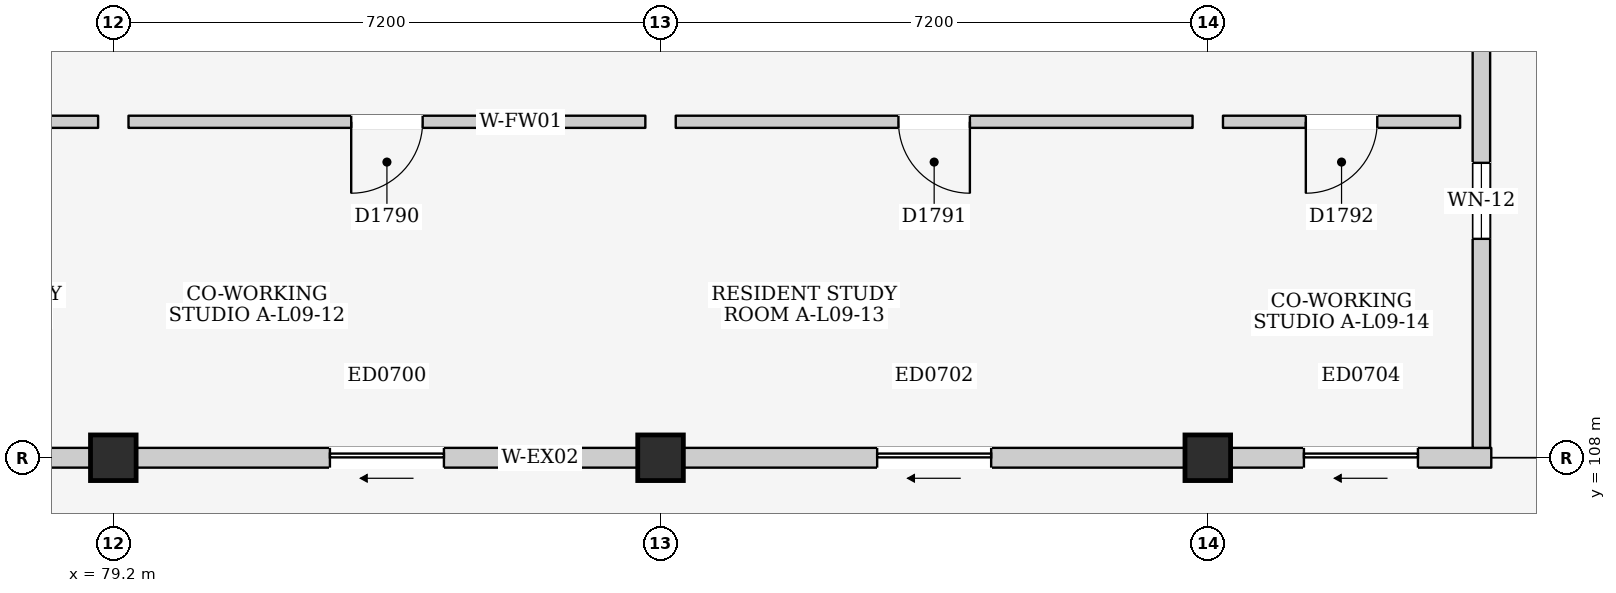
"""IFC4 building model, lengths in metres.
Left out: names, types, materials, properties, quantities, classifications, styles, units other than length and angle.
Written with IfcOpenShell. Run it as: python <this file> out.ifc"""

import sys

from ifc_helpers import new_model, si_unit, direction, frame, frame_2d, origin, origin_2d, place, context, subcontext, project, spatial, rectangle, extrude, element, fill, save


model = new_model("IFC4")
c1 = context("Model", 3, precision=1e-05, world=origin(), true_north=direction((0.0, 1.0)))
c2 = subcontext(c1, "Body", "Model", "MODEL_VIEW")
j1 = project(units=[si_unit("LENGTHUNIT", "METRE"), si_unit("PLANEANGLEUNIT", "RADIAN")], contexts=[c1])
p1 = place(None, origin())
s1 = spatial("IfcSite", under=j1, at=p1, CompositionType="ELEMENT")
p2 = place(p1, origin())
s2 = spatial("IfcBuilding", under=s1, at=p2, CompositionType="ELEMENT")
p3 = place(p2, frame((0.0, 0.0, 31.5)))
s3 = spatial("IfcBuildingStorey", under=s2, at=p3, CompositionType="ELEMENT", Elevation=31.5)
for number, where, z_axis, x_axis in (
    (1, (79.2, 108.0, 0.0), (0.0, 0.0, 1.0), (1.0, 0.0, 0.0)),
    (2, (86.4, 108.0, 0.0), (0.0, 0.0, 1.0), (1.0, 0.0, 0.0)),
    (3, (93.6, 108.0, 0.0), (0.0, 0.0, 1.0), (1.0, 0.0, 0.0)),
):
    element("IfcColumn", number, at=place(p3, frame(where, z_axis=z_axis, x_axis=x_axis)), inside=s3, PredefinedType="COLUMN", context=c2, shape_type="SweptSolid", body=[
        extrude(rectangle(XDim=0.6, YDim=0.6, at=origin_2d()), origin(), (0.0, 0.0, 1.0), 3.3),
    ])
p4 = place(p3, frame((72.3, 108.0, 0.0), z_axis=(0.0, 0.0, 1.0), x_axis=(1.0, 0.0, 0.0)))
e4 = element("IfcWall", 4, at=p4, inside=s3, PredefinedType="ELEMENTEDWALL", context=c2, shape_type="SweptSolid", body=[
    extrude(rectangle(XDim=6.6, YDim=0.26, at=frame_2d((3.3, 0.0))), origin(), (0.0, 0.0, 1.0), 2.415),
])
p5 = place(p4, frame((2.55, 0.0, 0.0)))
e5 = element("IfcOpeningElement", 5, at=p5, cuts=e4, PredefinedType="OPENING", context=c2, shape_type="SweptSolid", body=[
    extrude(rectangle(XDim=1.5, YDim=2.12, at=frame_2d((0.75, 1.06))), frame((0.0, 0.145, 0.0), z_axis=(0.0, -1.0, 0.0), x_axis=(1.0, 0.0, 0.0)), (0.0, 0.0, 1.0), 0.29),
])
p6 = place(p3, frame((79.5, 108.0, 0.0), z_axis=(0.0, 0.0, 1.0), x_axis=(1.0, 0.0, 0.0)))
e6 = element("IfcWall", 6, at=p6, inside=s3, PredefinedType="ELEMENTEDWALL", context=c2, shape_type="SweptSolid", body=[
    extrude(rectangle(XDim=6.6, YDim=0.26, at=frame_2d((3.3, 0.0))), origin(), (0.0, 0.0, 1.0), 2.415),
])
p7 = place(p6, frame((2.55, 0.0, 0.0)))
e7 = element("IfcOpeningElement", 7, at=p7, cuts=e6, PredefinedType="OPENING", context=c2, shape_type="SweptSolid", body=[
    extrude(rectangle(XDim=1.5, YDim=2.12, at=frame_2d((0.75, 1.06))), frame((0.0, 0.145, 0.0), z_axis=(0.0, -1.0, 0.0), x_axis=(1.0, 0.0, 0.0)), (0.0, 0.0, 1.0), 0.29),
])
p8 = place(p3, frame((86.7, 108.0, 0.0), z_axis=(0.0, 0.0, 1.0), x_axis=(1.0, 0.0, 0.0)))
e8 = element("IfcWall", 8, at=p8, inside=s3, PredefinedType="ELEMENTEDWALL", context=c2, shape_type="SweptSolid", body=[
    extrude(rectangle(XDim=6.6, YDim=0.26, at=frame_2d((3.3, 0.0))), origin(), (0.0, 0.0, 1.0), 2.415),
])
p9 = place(p8, frame((2.55, 0.0, 0.0)))
e9 = element("IfcOpeningElement", 9, at=p9, cuts=e8, PredefinedType="OPENING", context=c2, shape_type="SweptSolid", body=[
    extrude(rectangle(XDim=1.5, YDim=2.12, at=frame_2d((0.75, 1.06))), frame((0.0, 0.145, 0.0), z_axis=(0.0, -1.0, 0.0), x_axis=(1.0, 0.0, 0.0)), (0.0, 0.0, 1.0), 0.29),
])
p10 = place(p3, frame((93.9, 108.0, 0.0), z_axis=(0.0, 0.0, 1.0), x_axis=(1.0, 0.0, 0.0)))
e10 = element("IfcWall", 10, at=p10, inside=s3, PredefinedType="ELEMENTEDWALL", context=c2, shape_type="SweptSolid", body=[
    extrude(rectangle(XDim=3.43, YDim=0.26, at=frame_2d((1.715, 0.0))), origin(), (0.0, 0.0, 1.0), 2.415),
])
p11 = place(p10, frame((0.965, 0.0, 0.0)))
e11 = element("IfcOpeningElement", 11, at=p11, cuts=e10, PredefinedType="OPENING", context=c2, shape_type="SweptSolid", body=[
    extrude(rectangle(XDim=1.5, YDim=2.12, at=frame_2d((0.75, 1.06))), frame((0.0, 0.145, 0.0), z_axis=(0.0, -1.0, 0.0), x_axis=(1.0, 0.0, 0.0)), (0.0, 0.0, 1.0), 0.29),
])
p12 = place(p3, frame((97.2, 108.13, 0.0), z_axis=(0.0, 0.0, 1.0), x_axis=(0.0, 1.0, 0.0)))
e12 = element("IfcWall", 12, at=p12, inside=s3, PredefinedType="ELEMENTEDWALL", context=c2, shape_type="SweptSolid", body=[
    extrude(rectangle(XDim=7.07, YDim=0.23, at=frame_2d((3.535, 0.0))), origin(), (0.0, 0.0, 1.0), 2.515),
])
p13 = place(p12, frame((2.75, 0.0, 1.1)))
e13 = element("IfcOpeningElement", 13, at=p13, cuts=e12, PredefinedType="OPENING", context=c2, shape_type="SweptSolid", body=[
    extrude(rectangle(XDim=1.0, YDim=0.9, at=frame_2d((0.5, 0.45))), frame((0.0, 0.13, 0.0), z_axis=(0.0, -1.0, 0.0), x_axis=(1.0, 0.0, 0.0)), (0.0, 0.0, 1.0), 0.26),
])
p14 = place(p3, frame((72.2, 112.42, 0.0), z_axis=(0.0, 0.0, 1.0), x_axis=(1.0, 0.0, 0.0)))
e14 = element("IfcWall", 14, at=p14, inside=s3, PredefinedType="PARTITIONING", context=c2, shape_type="SweptSolid", body=[
    extrude(rectangle(XDim=6.8, YDim=0.16, at=frame_2d((3.4, 0.0))), origin(), (0.0, 0.0, 1.0), 3.08),
])
p15 = place(p14, frame((2.93, 0.0, 0.0)))
e15 = element("IfcOpeningElement", 15, at=p15, cuts=e14, PredefinedType="OPENING", context=c2, shape_type="SweptSolid", body=[
    extrude(rectangle(XDim=0.94, YDim=2.12, at=frame_2d((0.47, 1.06))), frame((0.0, 0.095, 0.0), z_axis=(0.0, -1.0, 0.0), x_axis=(1.0, 0.0, 0.0)), (0.0, 0.0, 1.0), 0.19),
])
p16 = place(p3, frame((79.4, 112.42, 0.0), z_axis=(0.0, 0.0, 1.0), x_axis=(1.0, 0.0, 0.0)))
e16 = element("IfcWall", 16, at=p16, inside=s3, PredefinedType="PARTITIONING", context=c2, shape_type="SweptSolid", body=[
    extrude(rectangle(XDim=6.8, YDim=0.16, at=frame_2d((3.4, 0.0))), origin(), (0.0, 0.0, 1.0), 3.08),
])
p17 = place(p16, frame((2.93, 0.0, 0.0)))
e17 = element("IfcOpeningElement", 17, at=p17, cuts=e16, PredefinedType="OPENING", context=c2, shape_type="SweptSolid", body=[
    extrude(rectangle(XDim=0.94, YDim=2.12, at=frame_2d((0.47, 1.06))), frame((0.0, 0.095, 0.0), z_axis=(0.0, -1.0, 0.0), x_axis=(1.0, 0.0, 0.0)), (0.0, 0.0, 1.0), 0.19),
])
p18 = place(p3, frame((86.6, 112.42, 0.0), z_axis=(0.0, 0.0, 1.0), x_axis=(1.0, 0.0, 0.0)))
e18 = element("IfcWall", 18, at=p18, inside=s3, PredefinedType="PARTITIONING", context=c2, shape_type="SweptSolid", body=[
    extrude(rectangle(XDim=6.8, YDim=0.16, at=frame_2d((3.4, 0.0))), origin(), (0.0, 0.0, 1.0), 3.08),
])
p19 = place(p18, frame((2.93, 0.0, 0.0)))
e19 = element("IfcOpeningElement", 19, at=p19, cuts=e18, PredefinedType="OPENING", context=c2, shape_type="SweptSolid", body=[
    extrude(rectangle(XDim=0.94, YDim=2.12, at=frame_2d((0.47, 1.06))), frame((0.0, 0.095, 0.0), z_axis=(0.0, -1.0, 0.0), x_axis=(1.0, 0.0, 0.0)), (0.0, 0.0, 1.0), 0.19),
])
p20 = place(p3, frame((93.8, 112.42, 0.0), z_axis=(0.0, 0.0, 1.0), x_axis=(1.0, 0.0, 0.0)))
e20 = element("IfcWall", 20, at=p20, inside=s3, PredefinedType="PARTITIONING", context=c2, shape_type="SweptSolid", body=[
    extrude(rectangle(XDim=3.12, YDim=0.16, at=frame_2d((1.56, 0.0))), origin(), (0.0, 0.0, 1.0), 3.08),
])
p21 = place(p20, frame((1.09, 0.0, 0.0)))
e21 = element("IfcOpeningElement", 21, at=p21, cuts=e20, PredefinedType="OPENING", context=c2, shape_type="SweptSolid", body=[
    extrude(rectangle(XDim=0.94, YDim=2.12, at=frame_2d((0.47, 1.06))), frame((0.0, 0.095, 0.0), z_axis=(0.0, -1.0, 0.0), x_axis=(1.0, 0.0, 0.0)), (0.0, 0.0, 1.0), 0.19),
])
p22 = place(p7, frame((1.5, 0.0, 0.0), z_axis=(0.0, 0.0, 1.0), x_axis=(-1.0, 0.0, 0.0)))
e22 = element("IfcDoor", 22, at=p22, inside=s3, OperationType="SLIDING_TO_LEFT", PredefinedType="DOOR", context=c2, shape_type="SweptSolid", body=[
    extrude(rectangle(XDim=1.5, YDim=2.12, at=frame_2d((0.75, 1.06))), frame((0.0, 0.025, 0.0), z_axis=(0.0, -1.0, 0.0), x_axis=(1.0, 0.0, 0.0)), (0.0, 0.0, 1.0), 0.05),
])
fill(e7, e22)
p23 = place(p9, frame((1.5, 0.0, 0.0), z_axis=(0.0, 0.0, 1.0), x_axis=(-1.0, 0.0, 0.0)))
e23 = element("IfcDoor", 23, at=p23, inside=s3, OperationType="SLIDING_TO_LEFT", PredefinedType="DOOR", context=c2, shape_type="SweptSolid", body=[
    extrude(rectangle(XDim=1.5, YDim=2.12, at=frame_2d((0.75, 1.06))), frame((0.0, 0.025, 0.0), z_axis=(0.0, -1.0, 0.0), x_axis=(1.0, 0.0, 0.0)), (0.0, 0.0, 1.0), 0.05),
])
fill(e9, e23)
p24 = place(p11, frame((1.5, 0.0, 0.0), z_axis=(0.0, 0.0, 1.0), x_axis=(-1.0, 0.0, 0.0)))
e24 = element("IfcDoor", 24, at=p24, inside=s3, OperationType="SLIDING_TO_LEFT", PredefinedType="DOOR", context=c2, shape_type="SweptSolid", body=[
    extrude(rectangle(XDim=1.5, YDim=2.12, at=frame_2d((0.75, 1.06))), frame((0.0, 0.025, 0.0), z_axis=(0.0, -1.0, 0.0), x_axis=(1.0, 0.0, 0.0)), (0.0, 0.0, 1.0), 0.05),
])
fill(e11, e24)
p25 = place(p13, origin())
e25 = element("IfcWindow", 25, at=p25, inside=s3, PartitioningType="SINGLE_PANEL", PredefinedType="WINDOW", context=c2, shape_type="SweptSolid", body=[
    extrude(rectangle(XDim=1.0, YDim=0.9, at=frame_2d((0.5, 0.45))), frame((0.0, 0.03, 0.0), z_axis=(0.0, -1.0, 0.0), x_axis=(1.0, 0.0, 0.0)), (0.0, 0.0, 1.0), 0.06),
])
fill(e13, e25)
p26 = place(p17, frame((0.94, 0.0, 0.0), z_axis=(0.0, 0.0, 1.0), x_axis=(-1.0, 0.0, 0.0)))
e26 = element("IfcDoor", 26, at=p26, inside=s3, OperationType="SINGLE_SWING_RIGHT", PredefinedType="DOOR", context=c2, shape_type="SweptSolid", body=[
    extrude(rectangle(XDim=0.94, YDim=2.12, at=frame_2d((0.47, 1.06))), frame((0.0, 0.025, 0.0), z_axis=(0.0, -1.0, 0.0), x_axis=(1.0, 0.0, 0.0)), (0.0, 0.0, 1.0), 0.05),
])
fill(e17, e26)
p27 = place(p19, frame((0.94, 0.0, 0.0), z_axis=(0.0, 0.0, 1.0), x_axis=(-1.0, 0.0, 0.0)))
e27 = element("IfcDoor", 27, at=p27, inside=s3, OperationType="SINGLE_SWING_LEFT", PredefinedType="DOOR", context=c2, shape_type="SweptSolid", body=[
    extrude(rectangle(XDim=0.94, YDim=2.12, at=frame_2d((0.47, 1.06))), frame((0.0, 0.025, 0.0), z_axis=(0.0, -1.0, 0.0), x_axis=(1.0, 0.0, 0.0)), (0.0, 0.0, 1.0), 0.05),
])
fill(e19, e27)
p28 = place(p21, frame((0.94, 0.0, 0.0), z_axis=(0.0, 0.0, 1.0), x_axis=(-1.0, 0.0, 0.0)))
e28 = element("IfcDoor", 28, at=p28, inside=s3, OperationType="SINGLE_SWING_RIGHT", PredefinedType="DOOR", context=c2, shape_type="SweptSolid", body=[
    extrude(rectangle(XDim=0.94, YDim=2.12, at=frame_2d((0.47, 1.06))), frame((0.0, 0.025, 0.0), z_axis=(0.0, -1.0, 0.0), x_axis=(1.0, 0.0, 0.0)), (0.0, 0.0, 1.0), 0.05),
])
fill(e21, e28)
save(model, sys.argv[1])
